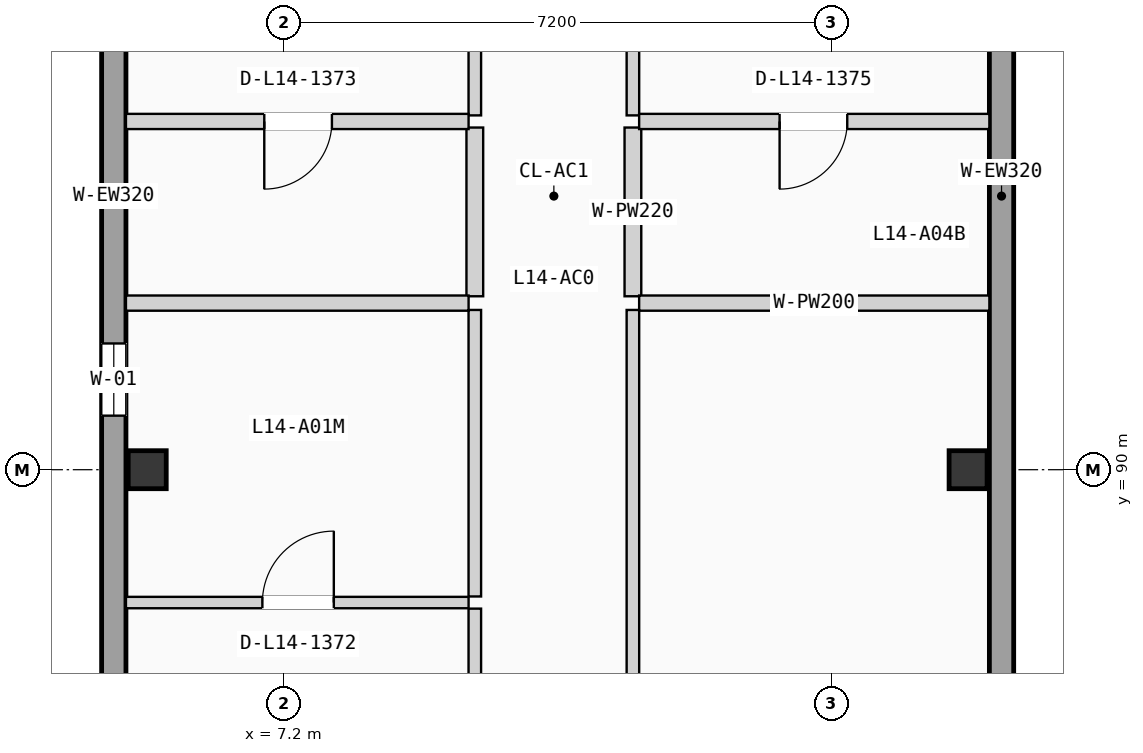
"""IFC4 building model, lengths in metres.
Left out: names, types, materials, properties, quantities, classifications, styles, units other than length and angle.
Written with IfcOpenShell. Run it as: python <this file> out.ifc"""

import sys

from ifc_helpers import new_model, si_unit, direction, frame, frame_2d, origin, origin_2d, place, context, subcontext, project, spatial, rectangle, extrude, element, fill, save


model = new_model("IFC4")
c1 = context("Model", 3, precision=1e-05, world=origin(), true_north=direction((0.0, 1.0)))
c2 = subcontext(c1, "Body", "Model", "MODEL_VIEW")
j1 = project(units=[si_unit("LENGTHUNIT", "METRE"), si_unit("PLANEANGLEUNIT", "RADIAN")], contexts=[c1])
p1 = place(None, origin())
s1 = spatial("IfcSite", under=j1, at=p1, CompositionType="ELEMENT")
p2 = place(p1, origin())
s2 = spatial("IfcBuilding", under=s1, at=p2, CompositionType="ELEMENT")
p3 = place(p2, frame((0.0, 0.0, 46.725)))
s3 = spatial("IfcBuildingStorey", under=s2, at=p3, CompositionType="ELEMENT", Elevation=46.725)
for number, where, z_axis, x_axis in (
    (1, (5.4, 90.0, 0.0), (0.0, 0.0, 1.0), (1.0, 0.0, 0.0)),
    (2, (16.2, 90.0, 0.0), (0.0, 0.0, 1.0), (1.0, 0.0, 0.0)),
):
    element("IfcColumn", number, at=place(p3, frame(where, z_axis=z_axis, x_axis=x_axis)), inside=s3, PredefinedType="COLUMN", context=c2, shape_type="SweptSolid", body=[
        extrude(rectangle(XDim=0.5, YDim=0.5, at=origin_2d()), origin(), (0.0, 0.0, 1.0), 2.85),
    ])
p4 = place(p3, frame((4.96, 68.72, 0.0), z_axis=(0.0, 0.0, 1.0), x_axis=(0.0, 1.0, 0.0)))
e3 = element("IfcWall", 3, at=p4, inside=s3, PredefinedType="SOLIDWALL", context=c2, shape_type="SweptSolid", body=[
    extrude(rectangle(XDim=49.76, YDim=0.32, at=frame_2d((24.88, 0.0))), origin(), (0.0, 0.0, 1.0), 2.55),
])
p5 = place(p4, frame((16.161, 0.0, 0.515)))
e4 = element("IfcOpeningElement", 4, at=p5, cuts=e3, PredefinedType="OPENING", context=c2, shape_type="SweptSolid", body=[
    extrude(rectangle(XDim=1.48, YDim=1.65, at=frame_2d((0.74, 0.825))), frame((0.0, 0.17, 0.0), z_axis=(0.0, -1.0, 0.0), x_axis=(1.0, 0.0, 0.0)), (0.0, 0.0, 1.0), 0.34),
])
p6 = place(p4, frame((21.991, 0.0, 0.85)))
e5 = element("IfcOpeningElement", 5, at=p6, cuts=e3, PredefinedType="OPENING", context=c2, shape_type="SweptSolid", body=[
    extrude(rectangle(XDim=0.95, YDim=1.2, at=frame_2d((0.475, 0.6))), frame((0.0, 0.17, 0.0), z_axis=(0.0, -1.0, 0.0), x_axis=(1.0, 0.0, 0.0)), (0.0, 0.0, 1.0), 0.34),
])
p7 = place(p4, frame((31.28, 0.0, 0.75)))
e6 = element("IfcOpeningElement", 6, at=p7, cuts=e3, PredefinedType="OPENING", context=c2, shape_type="SweptSolid", body=[
    extrude(rectangle(XDim=1.6, YDim=1.2, at=frame_2d((0.8, 0.6))), frame((0.0, 0.17, 0.0), z_axis=(0.0, -1.0, 0.0), x_axis=(1.0, 0.0, 0.0)), (0.0, 0.0, 1.0), 0.34),
])
p8 = place(p3, frame((16.64, 68.72, 0.0), z_axis=(0.0, 0.0, 1.0), x_axis=(0.0, 1.0, 0.0)))
e7 = element("IfcWall", 7, at=p8, inside=s3, PredefinedType="SOLIDWALL", context=c2, shape_type="SweptSolid", body=[
    extrude(rectangle(XDim=49.76, YDim=0.32, at=frame_2d((24.88, 0.0))), origin(), (0.0, 0.0, 1.0), 2.55),
])
p9 = place(p8, frame((16.88, 0.0, 0.75)))
e8 = element("IfcOpeningElement", 8, at=p9, cuts=e7, PredefinedType="OPENING", context=c2, shape_type="SweptSolid", body=[
    extrude(rectangle(XDim=1.6, YDim=1.35, at=frame_2d((0.8, 0.675))), frame((0.0, 0.17, 0.0), z_axis=(0.0, -1.0, 0.0), x_axis=(1.0, 0.0, 0.0)), (0.0, 0.0, 1.0), 0.34),
])
p10 = place(p8, frame((31.28, 0.0, 0.665)))
e9 = element("IfcOpeningElement", 9, at=p10, cuts=e7, PredefinedType="OPENING", context=c2, shape_type="SweptSolid", body=[
    extrude(rectangle(XDim=1.6, YDim=1.5, at=frame_2d((0.8, 0.75))), frame((0.0, 0.17, 0.0), z_axis=(0.0, -1.0, 0.0), x_axis=(1.0, 0.0, 0.0)), (0.0, 0.0, 1.0), 0.34),
])
p11 = place(p3, frame((9.71, 78.38, 0.0), z_axis=(0.0, 0.0, 1.0), x_axis=(0.0, 1.0, 0.0)))
e10 = element("IfcWall", 10, at=p11, inside=s3, PredefinedType="PARTITIONING", context=c2, shape_type="SweptSolid", body=[
    extrude(rectangle(XDim=9.792, YDim=0.165, at=frame_2d((4.896, 0.0))), origin(), (0.0, 0.0, 1.0), 2.39),
])
p12 = place(p11, frame((4.406, 0.0, 0.0)))
e11 = element("IfcOpeningElement", 11, at=p12, cuts=e10, PredefinedType="OPENING", context=c2, shape_type="SweptSolid", body=[
    extrude(rectangle(XDim=0.98, YDim=2.08, at=frame_2d((0.49, 1.04))), frame((0.0, 0.093, 0.0), z_axis=(0.0, -1.0, 0.0), x_axis=(1.0, 0.0, 0.0)), (0.0, 0.0, 1.0), 0.185),
])
p13 = place(p3, frame((9.71, 88.332, 0.0), z_axis=(0.0, 0.0, 1.0), x_axis=(0.0, 1.0, 0.0)))
e12 = element("IfcWall", 12, at=p13, inside=s3, PredefinedType="PARTITIONING", context=c2, shape_type="SweptSolid", body=[
    extrude(rectangle(XDim=3.77, YDim=0.165, at=frame_2d((1.885, 0.0))), origin(), (0.0, 0.0, 1.0), 2.39),
])
p14 = place(p3, frame((9.71, 92.282, 0.0), z_axis=(0.0, 0.0, 1.0), x_axis=(0.0, 1.0, 0.0)))
e13 = element("IfcWall", 13, at=p14, inside=s3, PredefinedType="PLUMBINGWALL", context=c2, shape_type="SweptSolid", body=[
    extrude(rectangle(XDim=2.22, YDim=0.22, at=frame_2d((1.11, 0.0))), origin(), (0.0, 0.0, 1.0), 2.39),
])
p15 = place(p3, frame((9.71, 94.662, 0.0), z_axis=(0.0, 0.0, 1.0), x_axis=(0.0, 1.0, 0.0)))
e14 = element("IfcWall", 14, at=p15, inside=s3, PredefinedType="PARTITIONING", context=c2, shape_type="SweptSolid", body=[
    extrude(rectangle(XDim=12.608, YDim=0.165, at=frame_2d((6.304, 0.0))), origin(), (0.0, 0.0, 1.0), 2.39),
])
p16 = place(p15, frame((5.814, 0.0, 0.0)))
e15 = element("IfcOpeningElement", 15, at=p16, cuts=e14, PredefinedType="OPENING", context=c2, shape_type="SweptSolid", body=[
    extrude(rectangle(XDim=0.98, YDim=2.08, at=frame_2d((0.49, 1.04))), frame((0.0, 0.093, 0.0), z_axis=(0.0, -1.0, 0.0), x_axis=(1.0, 0.0, 0.0)), (0.0, 0.0, 1.0), 0.185),
])
p17 = place(p3, frame((11.79, 75.945, 0.0), z_axis=(0.0, 0.0, 1.0), x_axis=(0.0, 1.0, 0.0)))
e16 = element("IfcWall", 16, at=p17, inside=s3, PredefinedType="PARTITIONING", context=c2, shape_type="SweptSolid", body=[
    extrude(rectangle(XDim=16.157, YDim=0.165, at=frame_2d((8.079, 0.0))), origin(), (0.0, 0.0, 1.0), 2.39),
])
p18 = place(p17, frame((7.616, 0.0, 0.0)))
e17 = element("IfcOpeningElement", 17, at=p18, cuts=e16, PredefinedType="OPENING", context=c2, shape_type="SweptSolid", body=[
    extrude(rectangle(XDim=0.98, YDim=2.08, at=frame_2d((0.49, 1.04))), frame((0.0, 0.093, 0.0), z_axis=(0.0, -1.0, 0.0), x_axis=(1.0, 0.0, 0.0)), (0.0, 0.0, 1.0), 0.185),
])
p19 = place(p3, frame((11.79, 92.282, 0.0), z_axis=(0.0, 0.0, 1.0), x_axis=(0.0, 1.0, 0.0)))
e18 = element("IfcWall", 18, at=p19, inside=s3, PredefinedType="PLUMBINGWALL", context=c2, shape_type="SweptSolid", body=[
    extrude(rectangle(XDim=2.22, YDim=0.22, at=frame_2d((1.11, 0.0))), origin(), (0.0, 0.0, 1.0), 2.39),
])
p20 = place(p3, frame((11.79, 94.662, 0.0), z_axis=(0.0, 0.0, 1.0), x_axis=(0.0, 1.0, 0.0)))
e19 = element("IfcWall", 19, at=p20, inside=s3, PredefinedType="PARTITIONING", context=c2, shape_type="SweptSolid", body=[
    extrude(rectangle(XDim=12.608, YDim=0.165, at=frame_2d((6.304, 0.0))), origin(), (0.0, 0.0, 1.0), 2.39),
])
p21 = place(p20, frame((5.814, 0.0, 0.0)))
e20 = element("IfcOpeningElement", 20, at=p21, cuts=e19, PredefinedType="OPENING", context=c2, shape_type="SweptSolid", body=[
    extrude(rectangle(XDim=0.98, YDim=2.08, at=frame_2d((0.49, 1.04))), frame((0.0, 0.093, 0.0), z_axis=(0.0, -1.0, 0.0), x_axis=(1.0, 0.0, 0.0)), (0.0, 0.0, 1.0), 0.185),
])
p22 = place(p3, frame((5.12, 88.252, 0.0), z_axis=(0.0, 0.0, 1.0), x_axis=(1.0, 0.0, 0.0)))
e21 = element("IfcWall", 21, at=p22, inside=s3, PredefinedType="PARTITIONING", context=c2, shape_type="SweptSolid", body=[
    extrude(rectangle(XDim=4.508, YDim=0.15, at=frame_2d((2.254, 0.0))), origin(), (0.0, 0.0, 1.0), 2.39),
])
p23 = place(p22, frame((1.795, 0.0, 0.0)))
e22 = element("IfcOpeningElement", 22, at=p23, cuts=e21, PredefinedType="OPENING", context=c2, shape_type="SweptSolid", body=[
    extrude(rectangle(XDim=0.94, YDim=2.06, at=frame_2d((0.47, 1.03))), frame((0.0, 0.085, 0.0), z_axis=(0.0, -1.0, 0.0), x_axis=(1.0, 0.0, 0.0)), (0.0, 0.0, 1.0), 0.17),
])
p24 = place(p3, frame((5.12, 92.192, 0.0), z_axis=(0.0, 0.0, 1.0), x_axis=(1.0, 0.0, 0.0)))
e23 = element("IfcWall", 23, at=p24, inside=s3, PredefinedType="PLUMBINGWALL", context=c2, shape_type="SweptSolid", body=[
    extrude(rectangle(XDim=4.508, YDim=0.2, at=frame_2d((2.254, 0.0))), origin(), (0.0, 0.0, 1.0), 2.39),
])
p25 = place(p3, frame((5.12, 94.582, 0.0), z_axis=(0.0, 0.0, 1.0), x_axis=(1.0, 0.0, 0.0)))
e24 = element("IfcWall", 24, at=p25, inside=s3, PredefinedType="PLUMBINGWALL", context=c2, shape_type="SweptSolid", body=[
    extrude(rectangle(XDim=4.508, YDim=0.2, at=frame_2d((2.254, 0.0))), origin(), (0.0, 0.0, 1.0), 2.39),
])
p26 = place(p25, frame((1.82, 0.0, 0.0)))
e25 = element("IfcOpeningElement", 25, at=p26, cuts=e24, PredefinedType="OPENING", context=c2, shape_type="SweptSolid", body=[
    extrude(rectangle(XDim=0.89, YDim=2.03, at=frame_2d((0.445, 1.015))), frame((0.0, 0.11, 0.0), z_axis=(0.0, -1.0, 0.0), x_axis=(1.0, 0.0, 0.0)), (0.0, 0.0, 1.0), 0.22),
])
p27 = place(p3, frame((11.872, 92.192, 0.0), z_axis=(0.0, 0.0, 1.0), x_axis=(1.0, 0.0, 0.0)))
e26 = element("IfcWall", 26, at=p27, inside=s3, PredefinedType="PLUMBINGWALL", context=c2, shape_type="SweptSolid", body=[
    extrude(rectangle(XDim=4.608, YDim=0.2, at=frame_2d((2.304, 0.0))), origin(), (0.0, 0.0, 1.0), 2.39),
])
p28 = place(p3, frame((11.872, 94.582, 0.0), z_axis=(0.0, 0.0, 1.0), x_axis=(1.0, 0.0, 0.0)))
e27 = element("IfcWall", 27, at=p28, inside=s3, PredefinedType="PLUMBINGWALL", context=c2, shape_type="SweptSolid", body=[
    extrude(rectangle(XDim=4.608, YDim=0.2, at=frame_2d((2.304, 0.0))), origin(), (0.0, 0.0, 1.0), 2.39),
])
p29 = place(p28, frame((1.848, 0.0, 0.0)))
e28 = element("IfcOpeningElement", 28, at=p29, cuts=e27, PredefinedType="OPENING", context=c2, shape_type="SweptSolid", body=[
    extrude(rectangle(XDim=0.89, YDim=2.03, at=frame_2d((0.445, 1.015))), frame((0.0, 0.11, 0.0), z_axis=(0.0, -1.0, 0.0), x_axis=(1.0, 0.0, 0.0)), (0.0, 0.0, 1.0), 0.22),
])
p30 = place(p6, origin())
e29 = element("IfcWindow", 29, at=p30, inside=s3, PartitioningType="SINGLE_PANEL", PredefinedType="WINDOW", context=c2, shape_type="SweptSolid", body=[
    extrude(rectangle(XDim=0.95, YDim=1.2, at=frame_2d((0.475, 0.6))), frame((0.0, 0.03, 0.0), z_axis=(0.0, -1.0, 0.0), x_axis=(1.0, 0.0, 0.0)), (0.0, 0.0, 1.0), 0.06),
])
fill(e5, e29)
p31 = place(p23, origin())
e30 = element("IfcDoor", 30, at=p31, inside=s3, OperationType="SINGLE_SWING_RIGHT", PredefinedType="DOOR", context=c2, shape_type="SweptSolid", body=[
    extrude(rectangle(XDim=0.94, YDim=2.06, at=frame_2d((0.47, 1.03))), frame((0.0, 0.025, 0.0), z_axis=(0.0, -1.0, 0.0), x_axis=(1.0, 0.0, 0.0)), (0.0, 0.0, 1.0), 0.05),
])
fill(e22, e30)
p32 = place(p26, frame((0.89, 0.0, 0.0), z_axis=(0.0, 0.0, 1.0), x_axis=(-1.0, 0.0, 0.0)))
e31 = element("IfcDoor", 31, at=p32, inside=s3, OperationType="SINGLE_SWING_LEFT", PredefinedType="DOOR", context=c2, shape_type="SweptSolid", body=[
    extrude(rectangle(XDim=0.89, YDim=2.03, at=frame_2d((0.445, 1.015))), frame((0.0, 0.025, 0.0), z_axis=(0.0, -1.0, 0.0), x_axis=(1.0, 0.0, 0.0)), (0.0, 0.0, 1.0), 0.05),
])
fill(e25, e31)
p33 = place(p29, frame((0.89, 0.0, 0.0), z_axis=(0.0, 0.0, 1.0), x_axis=(-1.0, 0.0, 0.0)))
e32 = element("IfcDoor", 32, at=p33, inside=s3, OperationType="SINGLE_SWING_LEFT", PredefinedType="DOOR", context=c2, shape_type="SweptSolid", body=[
    extrude(rectangle(XDim=0.89, YDim=2.03, at=frame_2d((0.445, 1.015))), frame((0.0, 0.025, 0.0), z_axis=(0.0, -1.0, 0.0), x_axis=(1.0, 0.0, 0.0)), (0.0, 0.0, 1.0), 0.05),
])
fill(e28, e32)
save(model, sys.argv[1])
